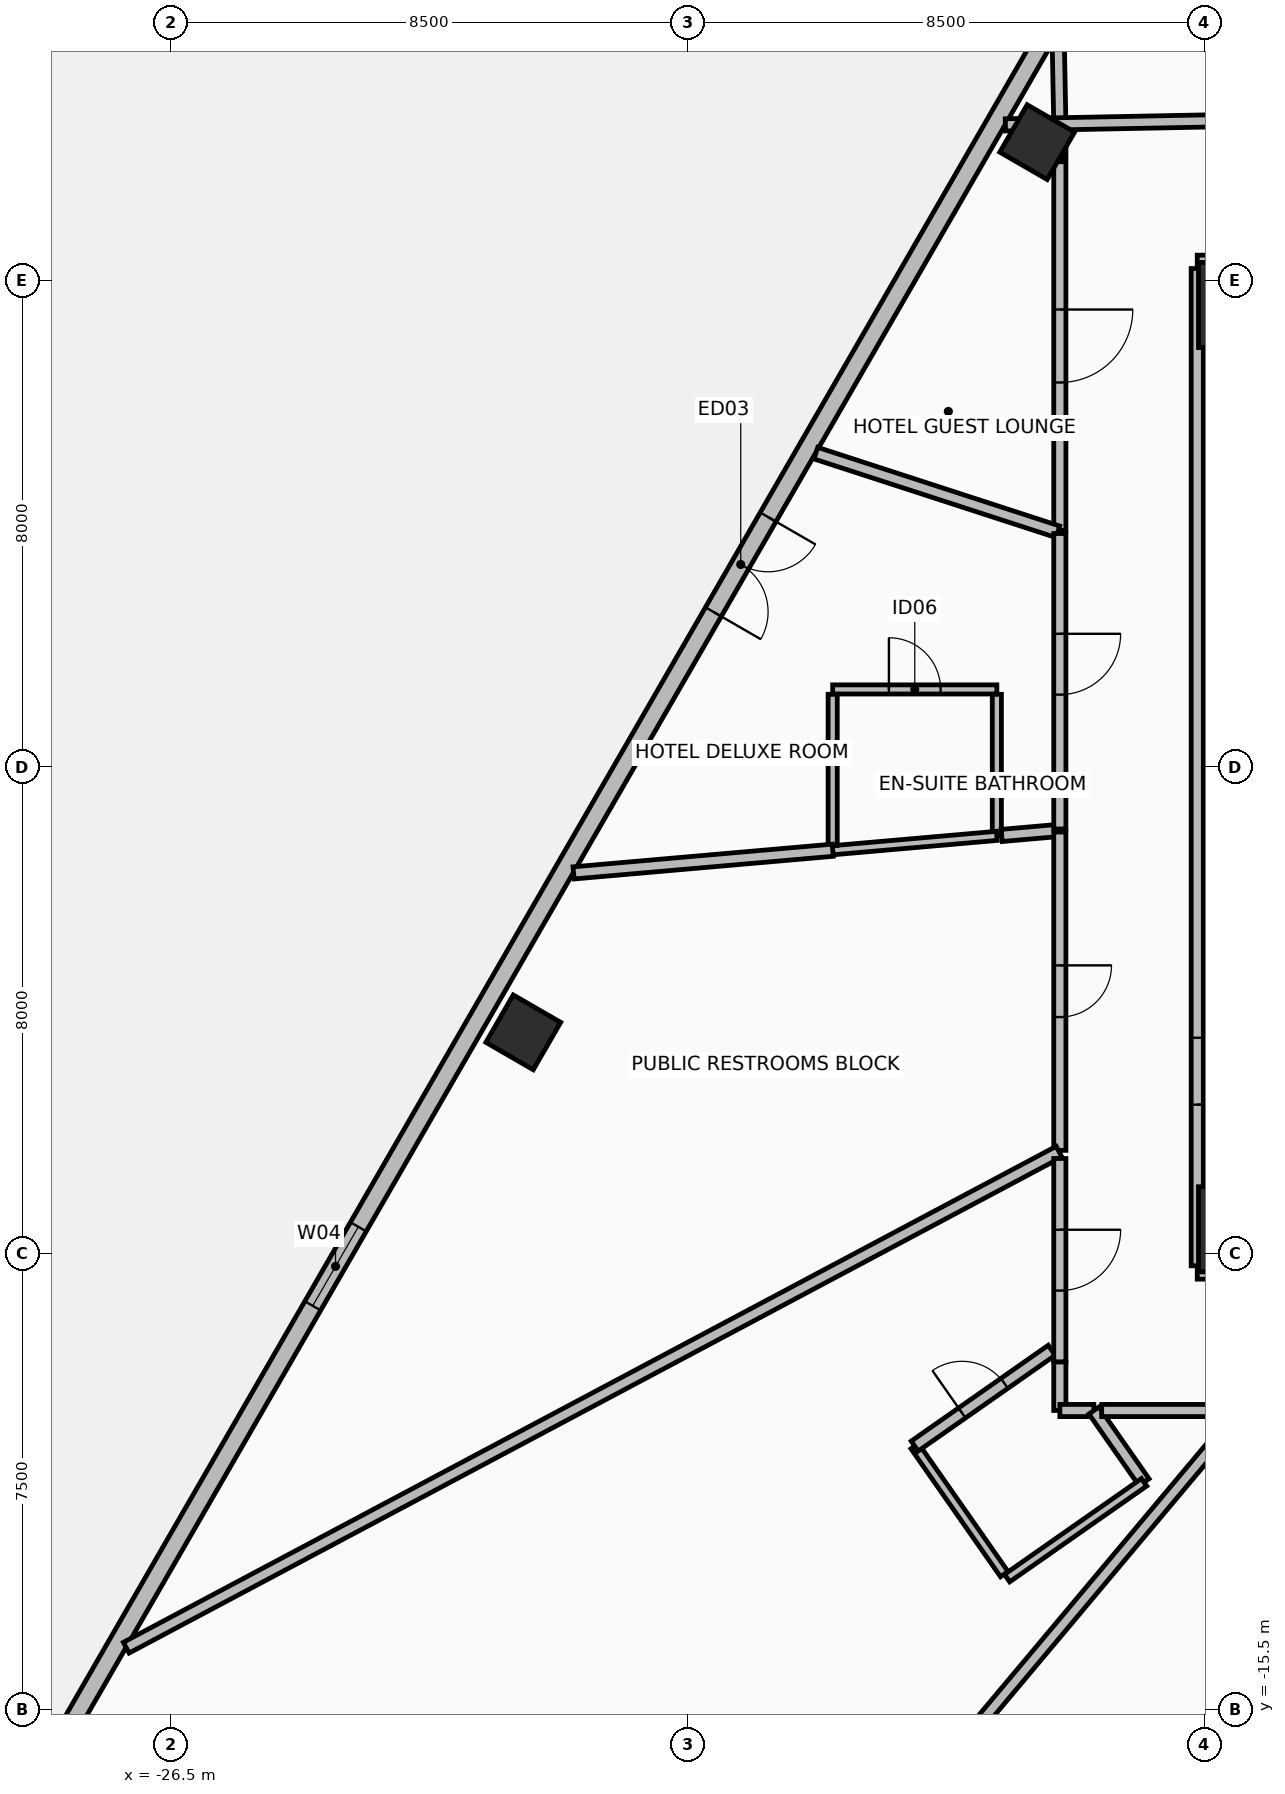
"""IFC4 building model, lengths in metres.
Left out: names, types, materials, properties, quantities, classifications, styles, units other than length and angle.
Written with IfcOpenShell. Run it as: python <this file> out.ifc"""

import sys

from ifc_helpers import new_model, si_unit, direction, frame, frame_2d, origin, origin_2d, place, context, subcontext, project, spatial, rectangle, hollow_rectangle, extrude, element, fill, save


model = new_model("IFC4")
c1 = context("Model", 3, precision=1e-05, world=origin(), true_north=direction((0.0, 1.0)))
c2 = subcontext(c1, "Body", "Model", "MODEL_VIEW")
j1 = project(units=[si_unit("LENGTHUNIT", "METRE"), si_unit("PLANEANGLEUNIT", "RADIAN")], contexts=[c1])
p1 = place(None, origin())
s1 = spatial("IfcSite", under=j1, at=p1, CompositionType="ELEMENT")
p2 = place(p1, origin())
s2 = spatial("IfcBuilding", under=s1, at=p2, CompositionType="ELEMENT")
p3 = place(p2, frame((0.0, 0.0, 31.8)))
s3 = spatial("IfcBuildingStorey", under=s2, at=p3, CompositionType="ELEMENT", Elevation=31.8)
for number, where, z_axis, x_axis in (
    (1, (-8.9, -7.6, 0.0), (0.0, 0.0, 1.0), (1.0, 0.0, 0.0)),
    (2, (-8.9, 7.6, 0.0), (0.0, 0.0, 1.0), (1.0, 0.0, 0.0)),
):
    element("IfcColumn", number, at=place(p3, frame(where, z_axis=z_axis, x_axis=x_axis)), inside=s3, PredefinedType="COLUMN", context=c2, shape_type="SweptSolid", body=[
        extrude(rectangle(XDim=1.4, YDim=1.4, at=origin_2d()), origin(), (0.0, 0.0, 1.0), 3.45),
    ])
for number, where, z_axis, x_axis in (
    (3, (-12.252, 10.279, 0.0), (0.0, 0.0, 1.0), (0.5, 0.866, 0.0)),
    (4, (-20.705, -4.361, 0.0), (0.0, 0.0, 1.0), (0.5, 0.866, 0.0)),
):
    element("IfcColumn", number, at=place(p3, frame(where, z_axis=z_axis, x_axis=x_axis)), inside=s3, PredefinedType="COLUMN", context=c2, shape_type="SweptSolid", body=[
        extrude(hollow_rectangle(XDim=0.9, YDim=0.9, WallThickness=0.05, at=origin_2d()), origin(), (0.0, 0.0, 1.0), 3.45),
    ])
p4 = place(p3, frame((-3.8, 26.418, 0.0), z_axis=(0.0, 0.0, 1.0), x_axis=(-0.499999546436, -0.86602566565, 0.0)))
e5 = element("IfcWall", 5, at=p4, inside=s3, PredefinedType="STANDARD", context=c2, shape_type="SweptSolid", body=[
    extrude(rectangle(XDim=53.312, YDim=0.3, at=frame_2d((26.656, 0.0))), origin(), (0.0, 0.0, 1.0), 3.275),
])
p5 = place(p4, frame((25.756, 0.0, 0.0)))
e6 = element("IfcOpeningElement", 6, at=p5, cuts=e5, PredefinedType="OPENING", context=c2, shape_type="SweptSolid", body=[
    extrude(rectangle(XDim=1.8, YDim=2.3, at=frame_2d((0.9, 1.15))), frame((0.0, 0.16, 0.0), z_axis=(0.0, -1.0, 0.0), x_axis=(1.0, 0.0, 0.0)), (0.0, 0.0, 1.0), 0.32),
])
p6 = place(p4, frame((12.578, 0.0, 0.85)))
e7 = element("IfcOpeningElement", 7, at=p6, cuts=e5, PredefinedType="OPENING", context=c2, shape_type="SweptSolid", body=[
    extrude(rectangle(XDim=1.5, YDim=2.1, at=frame_2d((0.75, 1.05))), frame((0.0, 0.16, 0.0), z_axis=(0.0, -1.0, 0.0), x_axis=(1.0, 0.0, 0.0)), (0.0, 0.0, 1.0), 0.32),
])
p7 = place(p4, frame((39.234, 0.0, 0.85)))
e8 = element("IfcOpeningElement", 8, at=p7, cuts=e5, PredefinedType="OPENING", context=c2, shape_type="SweptSolid", body=[
    extrude(rectangle(XDim=1.5, YDim=2.1, at=frame_2d((0.75, 1.05))), frame((0.0, 0.16, 0.0), z_axis=(0.0, -1.0, 0.0), x_axis=(1.0, 0.0, 0.0)), (0.0, 0.0, 1.0), 0.32),
])
p8 = place(p3, frame((-9.62, -8.32, 0.0), z_axis=(0.0, 0.0, 1.0), x_axis=(1.0, 0.0, 0.0)))
e9 = element("IfcWall", 9, at=p8, inside=s3, PredefinedType="PARTITIONING", context=c2, shape_type="SweptSolid", body=[
    extrude(rectangle(XDim=19.24, YDim=0.2, at=frame_2d((9.62, 0.0))), origin(), (0.0, 0.0, 1.0), 2.67),
])
p9 = place(p3, frame((9.62, 8.32, 0.0), z_axis=(0.0, 0.0, 1.0), x_axis=(-1.0, 0.0, 0.0)))
e10 = element("IfcWall", 10, at=p9, inside=s3, PredefinedType="PARTITIONING", context=c2, shape_type="SweptSolid", body=[
    extrude(rectangle(XDim=19.24, YDim=0.2, at=frame_2d((9.62, 0.0))), origin(), (0.0, 0.0, 1.0), 2.62),
])
p10 = place(p9, frame((15.02, 0.0, 0.0)))
e11 = element("IfcOpeningElement", 11, at=p10, cuts=e10, PredefinedType="OPENING", context=c2, shape_type="SweptSolid", body=[
    extrude(rectangle(XDim=0.9, YDim=2.1, at=frame_2d((0.45, 1.05))), frame((0.0, 0.11, 0.0), z_axis=(0.0, -1.0, 0.0), x_axis=(1.0, 0.0, 0.0)), (0.0, 0.0, 1.0), 0.22),
])
p11 = place(p3, frame((-9.62, 8.2, 0.0), z_axis=(0.0, 0.0, 1.0), x_axis=(0.0, -1.0, 0.0)))
e12 = element("IfcWall", 12, at=p11, inside=s3, PredefinedType="PARTITIONING", context=c2, shape_type="SweptSolid", body=[
    extrude(rectangle(XDim=16.4, YDim=0.2, at=frame_2d((8.2, 0.0))), origin(), (0.0, 0.0, 1.0), 2.67),
])
p12 = place(p11, frame((12.65, 0.0, 0.0)))
e13 = element("IfcOpeningElement", 13, at=p12, cuts=e12, PredefinedType="OPENING", context=c2, shape_type="SweptSolid", body=[
    extrude(rectangle(XDim=1.1, YDim=2.15, at=frame_2d((0.55, 1.075))), frame((0.0, 0.11, 0.0), z_axis=(0.0, -1.0, 0.0), x_axis=(1.0, 0.0, 0.0)), (0.0, 0.0, 1.0), 0.22),
])
p13 = place(p3, frame((-11.88, 10.58, 0.0), z_axis=(0.0, 0.0, 1.0), x_axis=(-0.019413816196, 0.999811534111, 0.0)))
e14 = element("IfcWall", 14, at=p13, inside=s3, PredefinedType="PARTITIONING", context=c2, shape_type="SweptSolid", body=[
    extrude(rectangle(XDim=1.484, YDim=0.2, at=frame_2d((0.742, 0.0))), origin(), (0.0, 0.0, 1.0), 2.47),
])
p14 = place(p3, frame((-9.335, 10.629, 0.0), z_axis=(0.0, 0.0, 1.0), x_axis=(-0.999810972065, -0.019442739982, 0.0)))
e15 = element("IfcWall", 15, at=p14, inside=s3, PredefinedType="PARTITIONING", context=c2, shape_type="SweptSolid", body=[
    extrude(rectangle(XDim=3.441, YDim=0.2, at=frame_2d((1.72, 0.0))), origin(), (0.0, 0.0, 1.0), 2.47),
])
p15 = place(p3, frame((-15.616, 1.278, 0.0), z_axis=(0.0, 0.0, 1.0), x_axis=(1.0, 0.0, 0.0)))
e16 = element("IfcWall", 16, at=p15, inside=s3, PredefinedType="PARTITIONING", context=c2, shape_type="SweptSolid", body=[
    extrude(rectangle(XDim=2.7, YDim=0.15, at=frame_2d((1.35, 0.0))), origin(), (0.0, 0.0, 1.0), 2.87),
])
p16 = place(p15, frame((0.925, 0.0, 0.0)))
e17 = element("IfcOpeningElement", 17, at=p16, cuts=e16, PredefinedType="OPENING", context=c2, shape_type="SweptSolid", body=[
    extrude(rectangle(XDim=0.85, YDim=2.1, at=frame_2d((0.425, 1.05))), frame((0.0, 0.085, 0.0), z_axis=(0.0, -1.0, 0.0), x_axis=(1.0, 0.0, 0.0)), (0.0, 0.0, 1.0), 0.17),
])
p17 = place(p3, frame((-12.916, 1.198, 0.0), z_axis=(0.0, 0.0, 1.0), x_axis=(0.0, -1.0, 0.0)))
e18 = element("IfcWall", 18, at=p17, inside=s3, PredefinedType="PARTITIONING", context=c2, shape_type="SweptSolid", body=[
    extrude(rectangle(XDim=2.328, YDim=0.15, at=frame_2d((1.164, 0.0))), origin(), (0.0, 0.0, 1.0), 2.87),
])
p18 = place(p3, frame((-12.916, -1.13, 0.0), z_axis=(0.0, 0.0, 1.0), x_axis=(-0.996191077086, -0.087197121134, 0.0)))
e19 = element("IfcWall", 19, at=p18, inside=s3, PredefinedType="PARTITIONING", context=c2, shape_type="SweptSolid", body=[
    extrude(rectangle(XDim=2.71, YDim=0.15, at=frame_2d((1.355, 0.0))), origin(), (0.0, 0.0, 1.0), 2.87),
])
p19 = place(p3, frame((-15.616, -1.286, 0.0), z_axis=(0.0, 0.0, 1.0), x_axis=(0.0, 1.0, 0.0)))
e20 = element("IfcWall", 20, at=p19, inside=s3, PredefinedType="PARTITIONING", context=c2, shape_type="SweptSolid", body=[
    extrude(rectangle(XDim=2.484, YDim=0.15, at=frame_2d((1.242, 0.0))), origin(), (0.0, 0.0, 1.0), 2.87),
])
p20 = place(p3, frame((-11.88, -9.78, 0.0), z_axis=(0.0, 0.0, 1.0), x_axis=(0.0, -1.0, 0.0)))
e21 = element("IfcWall", 21, at=p20, inside=s3, PredefinedType="PARTITIONING", context=c2, shape_type="SweptSolid", body=[
    extrude(rectangle(XDim=0.8, YDim=0.2, at=frame_2d((0.4, 0.0))), origin(), (0.0, 0.0, 1.0), 2.67),
])
p21 = place(p3, frame((-11.879, -10.58, 0.0), z_axis=(0.0, 0.0, 1.0), x_axis=(1.0, 0.0, 0.0)))
e22 = element("IfcWall", 22, at=p21, inside=s3, PredefinedType="PARTITIONING", context=c2, shape_type="SweptSolid", body=[
    extrude(rectangle(XDim=0.559, YDim=0.2, at=frame_2d((0.28, 0.0))), origin(), (0.0, 0.0, 1.0), 3.275),
])
p22 = place(p3, frame((-11.32, -10.58, 0.0), z_axis=(0.0, 0.0, 1.0), x_axis=(0.573177949093, -0.819430923674, 0.0)))
e23 = element("IfcWall", 23, at=p22, inside=s3, PredefinedType="PARTITIONING", context=c2, shape_type="SweptSolid", body=[
    extrude(rectangle(XDim=1.44, YDim=0.2, at=frame_2d((0.72, 0.0))), origin(), (0.0, 0.0, 1.0), 3.275),
])
p23 = place(p3, frame((-10.494, -11.76, 0.0), z_axis=(0.0, 0.0, 1.0), x_axis=(-0.819398712469, -0.573223996361, 0.0)))
e24 = element("IfcWall", 24, at=p23, inside=s3, PredefinedType="PARTITIONING", context=c2, shape_type="SweptSolid", body=[
    extrude(rectangle(XDim=2.75, YDim=0.15, at=frame_2d((1.375, 0.0))), origin(), (0.0, 0.0, 1.0), 3.275),
])
p24 = place(p3, frame((-12.794, -13.271, 0.0), z_axis=(0.0, 0.0, 1.0), x_axis=(-0.573130756233, 0.819463932251, 0.0)))
e25 = element("IfcWall", 25, at=p24, inside=s3, PredefinedType="PARTITIONING", context=c2, shape_type="SweptSolid", body=[
    extrude(rectangle(XDim=2.57, YDim=0.15, at=frame_2d((1.285, 0.0))), origin(), (0.0, 0.0, 1.0), 2.67),
])
p25 = place(p3, frame((-14.267, -11.165, 0.0), z_axis=(0.0, 0.0, 1.0), x_axis=(0.81944041023, 0.573164386614, 0.0)))
e26 = element("IfcWall", 26, at=p25, inside=s3, PredefinedType="PARTITIONING", context=c2, shape_type="SweptSolid", body=[
    extrude(rectangle(XDim=2.75, YDim=0.2, at=frame_2d((1.375, 0.0))), origin(), (0.0, 0.0, 1.0), 2.67),
])
p26 = place(p25, frame((0.95, 0.0, 0.0)))
e27 = element("IfcOpeningElement", 27, at=p26, cuts=e26, PredefinedType="OPENING", context=c2, shape_type="SweptSolid", body=[
    extrude(rectangle(XDim=0.85, YDim=2.1, at=frame_2d((0.425, 1.05))), frame((0.0, 0.11, 0.0), z_axis=(0.0, -1.0, 0.0), x_axis=(1.0, 0.0, 0.0)), (0.0, 0.0, 1.0), 0.22),
])
p27 = place(p3, frame((-19.878, -1.739, 0.0), z_axis=(0.0, 0.0, 1.0), x_axis=(0.996195699475, 0.087144296122, 0.0)))
e28 = element("IfcWall", 28, at=p27, inside=s3, PredefinedType="PARTITIONING", context=c2, shape_type="SweptSolid", body=[
    extrude(rectangle(XDim=4.278, YDim=0.2, at=frame_2d((2.139, 0.0))), origin(), (0.0, 0.0, 1.0), 2.47),
])
p28 = place(p3, frame((-12.836, -1.123, 0.0), z_axis=(0.0, 0.0, 1.0), x_axis=(0.996190305678, 0.087205933699, 0.0)))
e29 = element("IfcWall", 29, at=p28, inside=s3, PredefinedType="PARTITIONING", context=c2, shape_type="SweptSolid", body=[
    extrude(rectangle(XDim=0.932, YDim=0.2, at=frame_2d((0.466, 0.0))), origin(), (0.0, 0.0, 1.0), 3.275),
])
p29 = place(p3, frame((-11.88, -1.067, 0.0), z_axis=(0.0, 0.0, 1.0), x_axis=(0.0, -1.0, 0.0)))
e30 = element("IfcWall", 30, at=p29, inside=s3, PredefinedType="PARTITIONING", context=c2, shape_type="SweptSolid", body=[
    extrude(rectangle(XDim=5.235, YDim=0.2, at=frame_2d((2.618, 0.0))), origin(), (0.0, 0.0, 1.0), 3.275),
])
p30 = place(p29, frame((2.193, 0.0, 0.0)))
e31 = element("IfcOpeningElement", 31, at=p30, cuts=e30, PredefinedType="OPENING", context=c2, shape_type="SweptSolid", body=[
    extrude(rectangle(XDim=0.85, YDim=2.1, at=frame_2d((0.425, 1.05))), frame((0.0, 0.11, 0.0), z_axis=(0.0, -1.0, 0.0), x_axis=(1.0, 0.0, 0.0)), (0.0, 0.0, 1.0), 0.22),
])
p31 = place(p3, frame((-11.893, -6.324, 0.0), z_axis=(0.0, 0.0, 1.0), x_axis=(-0.882947372325, -0.46947197755, 0.0)))
e32 = element("IfcWall", 32, at=p31, inside=s3, PredefinedType="PARTITIONING", context=c2, shape_type="SweptSolid", body=[
    extrude(rectangle(XDim=17.374, YDim=0.2, at=frame_2d((8.687, 0.0))), origin(), (0.0, 0.0, 1.0), 2.47),
])
p32 = place(p3, frame((-11.88, 10.475, 0.0), z_axis=(0.0, 0.0, 1.0), x_axis=(0.0, -1.0, 0.0)))
e33 = element("IfcWall", 33, at=p32, inside=s3, PredefinedType="PARTITIONING", context=c2, shape_type="SweptSolid", body=[
    extrude(rectangle(XDim=0.453, YDim=0.2, at=frame_2d((0.226, 0.0))), origin(), (0.0, 0.0, 1.0), 2.47),
])
p33 = place(p3, frame((-11.985, 10.057, 0.0), z_axis=(0.0, 0.0, 1.0), x_axis=(-0.76613026962, 0.642685311776, 0.0)))
e34 = element("IfcWall", 34, at=p33, inside=s3, PredefinedType="PARTITIONING", context=c2, shape_type="SweptSolid", body=[
    extrude(rectangle(XDim=0.633, YDim=0.2, at=frame_2d((0.316, 0.0))), origin(), (0.0, 0.0, 1.0), 2.47),
])
p34 = place(p3, frame((-11.88, 9.957, 0.0), z_axis=(0.0, 0.0, 1.0), x_axis=(0.0, -1.0, 0.0)))
e35 = element("IfcWall", 35, at=p34, inside=s3, PredefinedType="PARTITIONING", context=c2, shape_type="SweptSolid", body=[
    extrude(rectangle(XDim=6.062, YDim=0.2, at=frame_2d((3.031, 0.0))), origin(), (0.0, 0.0, 1.0), 2.67),
])
p35 = place(p34, frame((2.431, 0.0, 0.0)))
e36 = element("IfcOpeningElement", 36, at=p35, cuts=e35, PredefinedType="OPENING", context=c2, shape_type="SweptSolid", body=[
    extrude(rectangle(XDim=1.2, YDim=2.15, at=frame_2d((0.6, 1.075))), frame((0.0, 0.11, 0.0), z_axis=(0.0, -1.0, 0.0), x_axis=(1.0, 0.0, 0.0)), (0.0, 0.0, 1.0), 0.22),
])
p36 = place(p3, frame((-11.913, 3.871, 0.0), z_axis=(0.0, 0.0, 1.0), x_axis=(-0.951048216474, 0.309042537431, 0.0)))
e37 = element("IfcWall", 37, at=p36, inside=s3, PredefinedType="PARTITIONING", context=c2, shape_type="SweptSolid", body=[
    extrude(rectangle(XDim=4.185, YDim=0.2, at=frame_2d((2.092, 0.0))), origin(), (0.0, 0.0, 1.0), 2.47),
])
p37 = place(p3, frame((-11.88, 3.842, 0.0), z_axis=(0.0, 0.0, 1.0), x_axis=(0.0, -1.0, 0.0)))
e38 = element("IfcWall", 38, at=p37, inside=s3, PredefinedType="PARTITIONING", context=c2, shape_type="SweptSolid", body=[
    extrude(rectangle(XDim=4.858, YDim=0.2, at=frame_2d((2.429, 0.0))), origin(), (0.0, 0.0, 1.0), 3.275),
])
p38 = place(p37, frame((1.649, 0.0, 0.0)))
e39 = element("IfcOpeningElement", 39, at=p38, cuts=e38, PredefinedType="OPENING", context=c2, shape_type="SweptSolid", body=[
    extrude(rectangle(XDim=1.0, YDim=2.15, at=frame_2d((0.5, 1.075))), frame((0.0, 0.11, 0.0), z_axis=(0.0, -1.0, 0.0), x_axis=(1.0, 0.0, 0.0)), (0.0, 0.0, 1.0), 0.22),
])
p39 = place(p3, frame((-11.88, -6.436, 0.0), z_axis=(0.0, 0.0, 1.0), x_axis=(0.0, -1.0, 0.0)))
e40 = element("IfcWall", 40, at=p39, inside=s3, PredefinedType="PARTITIONING", context=c2, shape_type="SweptSolid", body=[
    extrude(rectangle(XDim=3.344, YDim=0.2, at=frame_2d((1.672, 0.0))), origin(), (0.0, 0.0, 1.0), 2.67),
])
p40 = place(p39, frame((1.172, 0.0, 0.0)))
e41 = element("IfcOpeningElement", 41, at=p40, cuts=e40, PredefinedType="OPENING", context=c2, shape_type="SweptSolid", body=[
    extrude(rectangle(XDim=1.0, YDim=2.15, at=frame_2d((0.5, 1.075))), frame((0.0, 0.11, 0.0), z_axis=(0.0, -1.0, 0.0), x_axis=(1.0, 0.0, 0.0)), (0.0, 0.0, 1.0), 0.22),
])
p41 = place(p3, frame((-11.192, -10.58, 0.0), z_axis=(0.0, 0.0, 1.0), x_axis=(1.0, 0.0, 0.0)))
e42 = element("IfcWall", 42, at=p41, inside=s3, PredefinedType="PARTITIONING", context=c2, shape_type="SweptSolid", body=[
    extrude(rectangle(XDim=2.26, YDim=0.2, at=frame_2d((1.13, 0.0))), origin(), (0.0, 0.0, 1.0), 2.67),
])
p42 = place(p3, frame((-8.966, -10.685, 0.0), z_axis=(0.0, 0.0, 1.0), x_axis=(-0.642784617016, -0.766046954258, 0.0)))
e43 = element("IfcWall", 43, at=p42, inside=s3, PredefinedType="PARTITIONING", context=c2, shape_type="SweptSolid", body=[
    extrude(rectangle(XDim=16.978, YDim=0.2, at=frame_2d((8.489, 0.0))), origin(), (0.0, 0.0, 1.0), 2.47),
])
p43 = place(p5, frame((1.8, 0.0, 0.0), z_axis=(0.0, 0.0, 1.0), x_axis=(-1.0, 0.0, 0.0)))
e44 = element("IfcDoor", 44, at=p43, inside=s3, OperationType="DOUBLE_DOOR_SINGLE_SWING", PredefinedType="DOOR", context=c2, shape_type="SweptSolid", body=[
    extrude(rectangle(XDim=1.8, YDim=2.3, at=frame_2d((0.9, 1.15))), frame((0.0, 0.025, 0.0), z_axis=(0.0, -1.0, 0.0), x_axis=(1.0, 0.0, 0.0)), (0.0, 0.0, 1.0), 0.05),
])
fill(e6, e44)
p44 = place(p7, origin())
e45 = element("IfcWindow", 45, at=p44, inside=s3, PartitioningType="SINGLE_PANEL", PredefinedType="WINDOW", context=c2, shape_type="SweptSolid", body=[
    extrude(rectangle(XDim=1.5, YDim=2.1, at=frame_2d((0.75, 1.05))), frame((0.0, 0.03, 0.0), z_axis=(0.0, -1.0, 0.0), x_axis=(1.0, 0.0, 0.0)), (0.0, 0.0, 1.0), 0.06),
])
fill(e8, e45)
p45 = place(p12, frame((1.1, 0.0, 0.0), z_axis=(0.0, 0.0, 1.0), x_axis=(-1.0, 0.0, 0.0)))
e46 = element("IfcDoor", 46, at=p45, inside=s3, OperationType="SINGLE_SWING_LEFT", PredefinedType="DOOR", context=c2, shape_type="SweptSolid", body=[
    extrude(rectangle(XDim=1.1, YDim=2.15, at=frame_2d((0.55, 1.075))), frame((0.0, 0.025, 0.0), z_axis=(0.0, -1.0, 0.0), x_axis=(1.0, 0.0, 0.0)), (0.0, 0.0, 1.0), 0.05),
])
fill(e13, e46)
p46 = place(p16, origin())
e47 = element("IfcDoor", 47, at=p46, inside=s3, OperationType="SINGLE_SWING_RIGHT", PredefinedType="DOOR", context=c2, shape_type="SweptSolid", body=[
    extrude(rectangle(XDim=0.85, YDim=2.1, at=frame_2d((0.425, 1.05))), frame((0.0, 0.025, 0.0), z_axis=(0.0, -1.0, 0.0), x_axis=(1.0, 0.0, 0.0)), (0.0, 0.0, 1.0), 0.05),
])
fill(e17, e47)
p47 = place(p26, origin())
e48 = element("IfcDoor", 48, at=p47, inside=s3, OperationType="SINGLE_SWING_RIGHT", PredefinedType="DOOR", context=c2, shape_type="SweptSolid", body=[
    extrude(rectangle(XDim=0.85, YDim=2.1, at=frame_2d((0.425, 1.05))), frame((0.0, 0.025, 0.0), z_axis=(0.0, -1.0, 0.0), x_axis=(1.0, 0.0, 0.0)), (0.0, 0.0, 1.0), 0.05),
])
fill(e27, e48)
p48 = place(p30, origin())
e49 = element("IfcDoor", 49, at=p48, inside=s3, OperationType="SINGLE_SWING_RIGHT", PredefinedType="DOOR", context=c2, shape_type="SweptSolid", body=[
    extrude(rectangle(XDim=0.85, YDim=2.1, at=frame_2d((0.425, 1.05))), frame((0.0, 0.025, 0.0), z_axis=(0.0, -1.0, 0.0), x_axis=(1.0, 0.0, 0.0)), (0.0, 0.0, 1.0), 0.05),
])
fill(e31, e49)
p49 = place(p35, origin())
e50 = element("IfcDoor", 50, at=p49, inside=s3, OperationType="SINGLE_SWING_LEFT", PredefinedType="DOOR", context=c2, shape_type="SweptSolid", body=[
    extrude(rectangle(XDim=1.2, YDim=2.15, at=frame_2d((0.6, 1.075))), frame((0.0, 0.025, 0.0), z_axis=(0.0, -1.0, 0.0), x_axis=(1.0, 0.0, 0.0)), (0.0, 0.0, 1.0), 0.05),
])
fill(e36, e50)
p50 = place(p38, origin())
e51 = element("IfcDoor", 51, at=p50, inside=s3, OperationType="SINGLE_SWING_LEFT", PredefinedType="DOOR", context=c2, shape_type="SweptSolid", body=[
    extrude(rectangle(XDim=1.0, YDim=2.15, at=frame_2d((0.5, 1.075))), frame((0.0, 0.025, 0.0), z_axis=(0.0, -1.0, 0.0), x_axis=(1.0, 0.0, 0.0)), (0.0, 0.0, 1.0), 0.05),
])
fill(e39, e51)
p51 = place(p40, origin())
e52 = element("IfcDoor", 52, at=p51, inside=s3, OperationType="SINGLE_SWING_LEFT", PredefinedType="DOOR", context=c2, shape_type="SweptSolid", body=[
    extrude(rectangle(XDim=1.0, YDim=2.15, at=frame_2d((0.5, 1.075))), frame((0.0, 0.025, 0.0), z_axis=(0.0, -1.0, 0.0), x_axis=(1.0, 0.0, 0.0)), (0.0, 0.0, 1.0), 0.05),
])
fill(e41, e52)
save(model, sys.argv[1])
